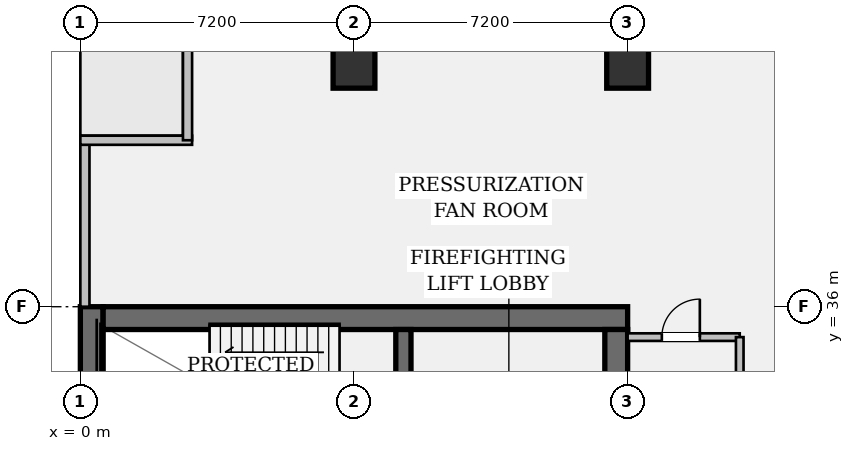
"""IFC4 building model, lengths in metres.
Left out: names, types, materials, properties, quantities, classifications, styles, units other than length and angle.
Written with IfcOpenShell. Run it as: python <this file> out.ifc"""

import sys

from ifc_helpers import new_model, si_unit, direction, frame, frame_2d, origin, origin_2d, place, context, subcontext, project, spatial, rectangle, hollow_rectangle, extrude, element, fill, save


model = new_model("IFC4")
c1 = context("Model", 3, precision=1e-05, world=origin(), true_north=direction((0.0, 1.0)))
c2 = subcontext(c1, "Body", "Model", "MODEL_VIEW")
j1 = project(units=[si_unit("LENGTHUNIT", "METRE"), si_unit("PLANEANGLEUNIT", "RADIAN")], contexts=[c1])
p1 = place(None, origin())
s1 = spatial("IfcSite", under=j1, at=p1, CompositionType="ELEMENT")
p2 = place(p1, origin())
s2 = spatial("IfcBuilding", under=s1, at=p2, CompositionType="ELEMENT")
p3 = place(p2, frame((0.0, 0.0, 26.25)))
s3 = spatial("IfcBuildingStorey", under=s2, at=p3, CompositionType="ELEMENT", Elevation=26.25)
p4 = place(p3, frame((0.3, 7.2, 0.0), z_axis=(0.0, 0.0, 1.0), x_axis=(0.0, 1.0, 0.0)))
e1 = element("IfcWall", 1, at=p4, inside=s3, PredefinedType="SHEAR", context=c2, shape_type="SweptSolid", body=[
    extrude(rectangle(XDim=28.8, YDim=0.6, at=frame_2d((14.4, 0.0))), origin(), (0.0, 0.0, 1.0), 4.62),
])
p5 = place(p3, frame((0.6, 35.7, 0.0), z_axis=(0.0, 0.0, 1.0), x_axis=(1.0, 0.0, 0.0)))
e2 = element("IfcWall", 2, at=p5, inside=s3, PredefinedType="SHEAR", context=c2, shape_type="SweptSolid", body=[
    extrude(rectangle(XDim=13.8, YDim=0.6, at=frame_2d((6.9, 0.0))), origin(), (0.0, 0.0, 1.0), 4.62),
])
p6 = place(p3, frame((14.1, 35.4, 0.0), z_axis=(0.0, 0.0, 1.0), x_axis=(0.0, -1.0, 0.0)))
e3 = element("IfcWall", 3, at=p6, inside=s3, PredefinedType="SHEAR", context=c2, shape_type="SweptSolid", body=[
    extrude(rectangle(XDim=27.6, YDim=0.6, at=frame_2d((13.8, 0.0))), origin(), (0.0, 0.0, 1.0), 4.62),
])
p7 = place(p6, frame((1.3, 0.0, 0.0)))
e4 = element("IfcOpeningElement", 4, at=p7, cuts=e3, PredefinedType="OPENING", context=c2, shape_type="SweptSolid", body=[
    extrude(rectangle(XDim=1.2, YDim=2.15, at=frame_2d((0.6, 1.075))), frame((0.0, 0.312, 0.0), z_axis=(0.0, -1.0, 0.0), x_axis=(1.0, 0.0, 0.0)), (0.0, 0.0, 1.0), 0.624),
])
p8 = place(p6, frame((25.25, 0.0, 0.0)))
e5 = element("IfcOpeningElement", 5, at=p8, cuts=e3, PredefinedType="OPENING", context=c2, shape_type="SweptSolid", body=[
    extrude(rectangle(XDim=1.2, YDim=2.15, at=frame_2d((0.6, 1.075))), frame((0.0, 0.312, 0.0), z_axis=(0.0, -1.0, 0.0), x_axis=(1.0, 0.0, 0.0)), (0.0, 0.0, 1.0), 0.624),
])
p9 = place(p6, frame((14.6, 0.0, 0.0)))
e6 = element("IfcOpeningElement", 6, at=p9, cuts=e3, PredefinedType="OPENING", context=c2, shape_type="SweptSolid", body=[
    extrude(rectangle(XDim=1.6, YDim=2.2, at=frame_2d((0.8, 1.1))), frame((0.0, 0.312, 0.0), z_axis=(0.0, -1.0, 0.0), x_axis=(1.0, 0.0, 0.0)), (0.0, 0.0, 1.0), 0.624),
])
p10 = place(p3, frame((8.5, 31.72, 0.0), z_axis=(0.0, 0.0, 1.0), x_axis=(0.0, 1.0, 0.0)))
e7 = element("IfcWall", 7, at=p10, inside=s3, PredefinedType="SHEAR", context=c2, shape_type="SweptSolid", body=[
    extrude(rectangle(XDim=3.68, YDim=0.4, at=frame_2d((1.84, 0.0))), origin(), (0.0, 0.0, 1.0), 4.62),
])
p11 = place(p10, frame((0.9, 0.0, 0.0)))
e8 = element("IfcOpeningElement", 8, at=p11, cuts=e7, PredefinedType="OPENING", context=c2, shape_type="SweptSolid", body=[
    extrude(rectangle(XDim=1.1, YDim=2.15, at=frame_2d((0.55, 1.075))), frame((0.0, 0.212, 0.0), z_axis=(0.0, -1.0, 0.0), x_axis=(1.0, 0.0, 0.0)), (0.0, 0.0, 1.0), 0.424),
])
for number, where, z_axis, x_axis in (
    (9, (7.2, 42.3, 0.0), (0.0, 0.0, 1.0), (1.0, 0.0, 0.0)),
    (10, (14.4, 42.3, 0.0), (0.0, 0.0, 1.0), (1.0, 0.0, 0.0)),
):
    element("IfcColumn", number, at=place(p3, frame(where, z_axis=z_axis, x_axis=x_axis)), inside=s3, PredefinedType="COLUMN", context=c2, shape_type="SweptSolid", body=[
        extrude(hollow_rectangle(XDim=1.1, YDim=1.1, WallThickness=0.07, at=origin_2d()), origin(), (0.0, 0.0, 1.0), 4.62),
    ])
p12 = place(p3, frame((0.12, 36.0, 0.0), z_axis=(0.0, 0.0, 1.0), x_axis=(0.0, 1.0, 0.0)))
e11 = element("IfcWall", 11, at=p12, inside=s3, PredefinedType="STANDARD", context=c2, shape_type="SweptSolid", body=[
    extrude(rectangle(XDim=4.38, YDim=0.24, at=frame_2d((2.19, 0.0))), origin(), (0.0, 0.0, 1.0), 4.62),
])
p13 = place(p3, frame((0.0, 40.38, 0.0), z_axis=(0.0, 0.0, 1.0), x_axis=(1.0, 0.0, 0.0)))
e12 = element("IfcWall", 12, at=p13, inside=s3, PredefinedType="STANDARD", context=c2, shape_type="SweptSolid", body=[
    extrude(rectangle(XDim=2.94, YDim=0.24, at=frame_2d((1.47, 0.0))), origin(), (0.0, 0.0, 1.0), 4.62),
])
p14 = place(p3, frame((2.82, 40.38, 0.0), z_axis=(0.0, 0.0, 1.0), x_axis=(0.0, 1.0, 0.0)))
e13 = element("IfcWall", 13, at=p14, inside=s3, PredefinedType="STANDARD", context=c2, shape_type="SweptSolid", body=[
    extrude(rectangle(XDim=2.7, YDim=0.24, at=frame_2d((1.35, 0.0))), origin(), (0.0, 0.0, 1.0), 4.62),
])
p15 = place(p3, frame((14.4, 35.2, 0.0), z_axis=(0.0, 0.0, 1.0), x_axis=(1.0, 0.0, 0.0)))
e14 = element("IfcWall", 14, at=p15, inside=s3, PredefinedType="PARTITIONING", context=c2, shape_type="SweptSolid", body=[
    extrude(rectangle(XDim=2.95, YDim=0.2, at=frame_2d((1.475, 0.0))), origin(), (0.0, 0.0, 1.0), 3.678),
])
p16 = place(p15, frame((0.9, 0.0, 0.0)))
e15 = element("IfcOpeningElement", 15, at=p16, cuts=e14, PredefinedType="OPENING", context=c2, shape_type="SweptSolid", body=[
    extrude(rectangle(XDim=1.0, YDim=2.15, at=frame_2d((0.5, 1.075))), frame((0.0, 0.112, 0.0), z_axis=(0.0, -1.0, 0.0), x_axis=(1.0, 0.0, 0.0)), (0.0, 0.0, 1.0), 0.224),
])
p17 = place(p3, frame((17.35, 17.5, 0.0), z_axis=(0.0, 0.0, 1.0), x_axis=(0.0, 1.0, 0.0)))
e16 = element("IfcWall", 16, at=p17, inside=s3, PredefinedType="PARTITIONING", context=c2, shape_type="SweptSolid", body=[
    extrude(rectangle(XDim=17.7, YDim=0.2, at=frame_2d((8.85, 0.0))), origin(), (0.0, 0.0, 1.0), 2.205),
])
p18 = place(p17, frame((14.0, 0.0, 0.0)))
e17 = element("IfcOpeningElement", 17, at=p18, cuts=e16, PredefinedType="OPENING", context=c2, shape_type="SweptSolid", body=[
    extrude(rectangle(XDim=1.2, YDim=2.02, at=frame_2d((0.6, 1.01))), frame((0.0, 0.112, 0.0), z_axis=(0.0, -1.0, 0.0), x_axis=(1.0, 0.0, 0.0)), (0.0, 0.0, 1.0), 0.224),
])
p19 = place(p16, origin())
e18 = element("IfcDoor", 18, at=p19, inside=s3, OperationType="SINGLE_SWING_RIGHT", PredefinedType="DOOR", context=c2, shape_type="SweptSolid", body=[
    extrude(rectangle(XDim=1.0, YDim=2.15, at=frame_2d((0.5, 1.075))), frame((0.0, 0.025, 0.0), z_axis=(0.0, -1.0, 0.0), x_axis=(1.0, 0.0, 0.0)), (0.0, 0.0, 1.0), 0.05),
])
fill(e15, e18)
save(model, sys.argv[1])
